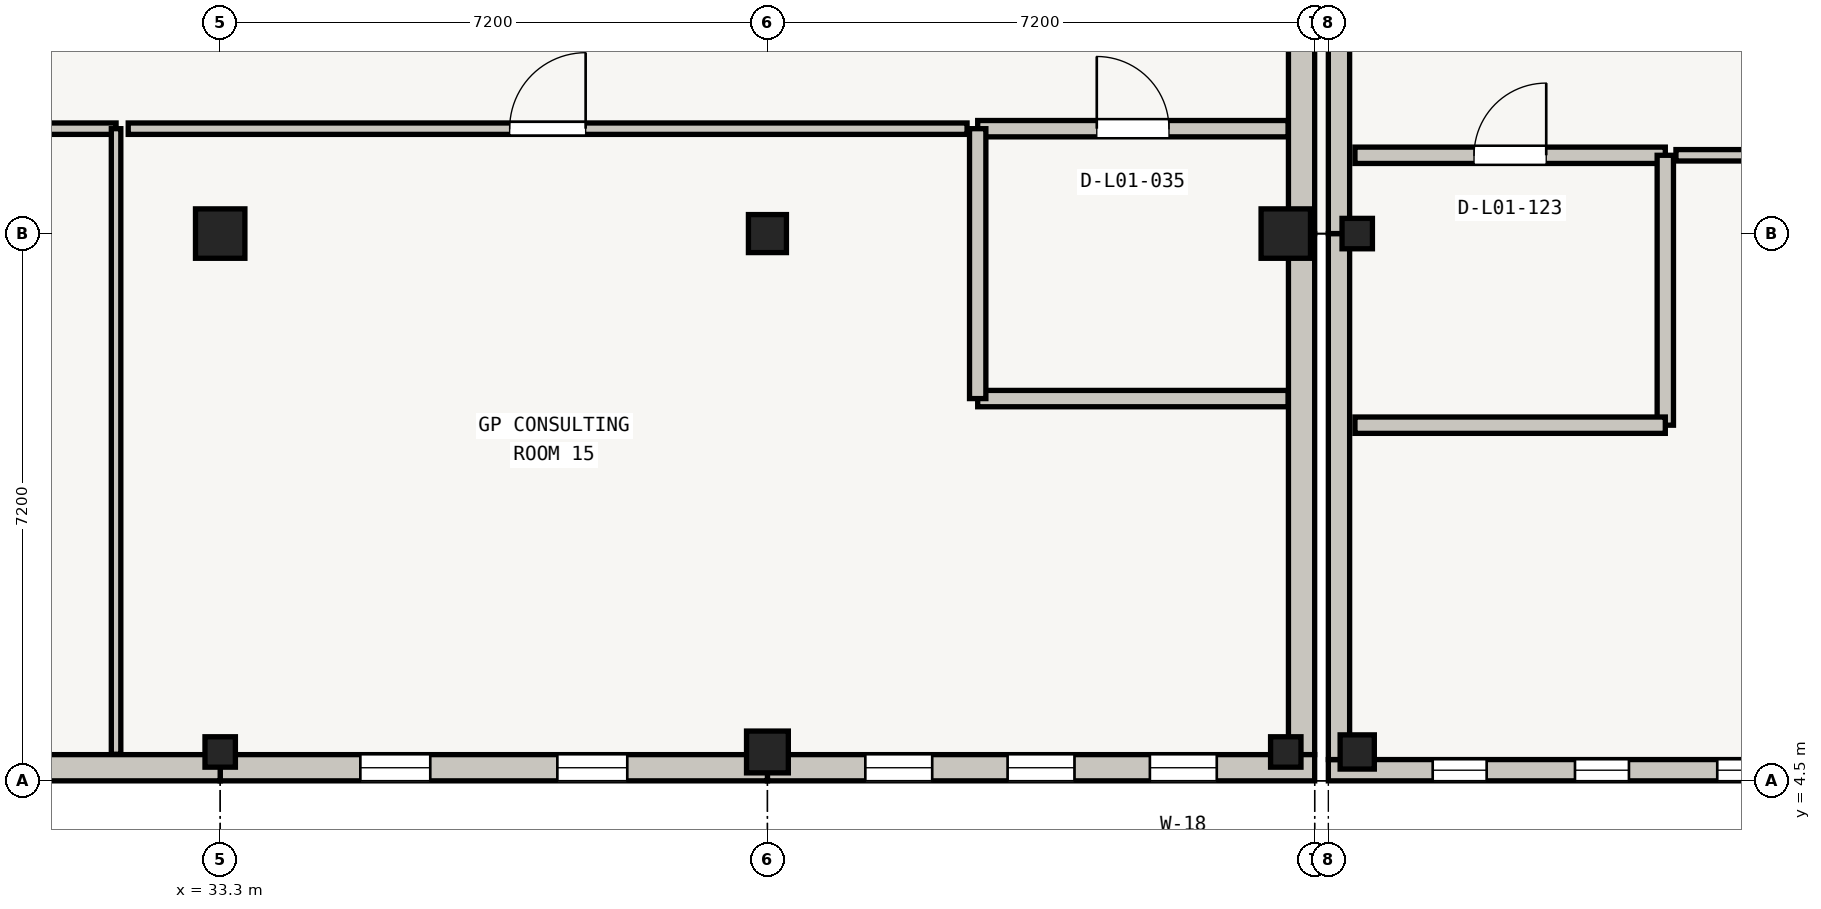
"""IFC4 building model, lengths in metres.
Left out: names, types, materials, properties, quantities, classifications, styles, units other than length and angle.
Written with IfcOpenShell. Run it as: python <this file> out.ifc"""

import sys

from ifc_helpers import new_model, si_unit, direction, frame, frame_2d, origin, origin_2d, place, context, subcontext, project, spatial, rectangle, extrude, element, fill, save


model = new_model("IFC4")
c1 = context("Model", 3, precision=1e-05, world=origin(), true_north=direction((0.0, 1.0)))
c2 = subcontext(c1, "Body", "Model", "MODEL_VIEW")
j1 = project(units=[si_unit("LENGTHUNIT", "METRE"), si_unit("PLANEANGLEUNIT", "RADIAN")], contexts=[c1])
p1 = place(None, origin())
s1 = spatial("IfcSite", under=j1, at=p1, CompositionType="ELEMENT")
p2 = place(p1, origin())
s2 = spatial("IfcBuilding", under=s1, at=p2, CompositionType="ELEMENT")
p3 = place(p2, frame((0.0, 0.0, 4.5)))
s3 = spatial("IfcBuildingStorey", under=s2, at=p3, CompositionType="ELEMENT", Elevation=4.5)
p4 = place(p3, frame((33.3, 4.88, 0.0), z_axis=(0.0, 0.0, 1.0), x_axis=(1.0, 0.0, 0.0)))
e1 = element("IfcColumn", 1, at=p4, inside=s3, PredefinedType="COLUMN", context=c2, shape_type="SweptSolid", body=[
    extrude(rectangle(XDim=0.4, YDim=0.4, at=origin_2d()), origin(), (0.0, 0.0, 1.0), 3.92),
])
p5 = place(p3, frame((33.3, 11.7, 0.0), z_axis=(0.0, 0.0, 1.0), x_axis=(1.0, 0.0, 0.0)))
e2 = element("IfcColumn", 2, at=p5, inside=s3, PredefinedType="COLUMN", context=c2, shape_type="SweptSolid", body=[
    extrude(rectangle(XDim=0.65, YDim=0.65, at=origin_2d()), origin(), (0.0, 0.0, 1.0), 3.92),
])
p6 = place(p3, frame((40.5, 4.88, 0.0), z_axis=(0.0, 0.0, 1.0), x_axis=(1.0, 0.0, 0.0)))
e3 = element("IfcColumn", 3, at=p6, inside=s3, PredefinedType="COLUMN", context=c2, shape_type="SweptSolid", body=[
    extrude(rectangle(XDim=0.55, YDim=0.55, at=origin_2d()), origin(), (0.0, 0.0, 1.0), 3.92),
])
p7 = place(p3, frame((40.5, 11.7, 0.0), z_axis=(0.0, 0.0, 1.0), x_axis=(1.0, 0.0, 0.0)))
e4 = element("IfcColumn", 4, at=p7, inside=s3, PredefinedType="COLUMN", context=c2, shape_type="SweptSolid", body=[
    extrude(rectangle(XDim=0.5, YDim=0.5, at=origin_2d()), origin(), (0.0, 0.0, 1.0), 3.92),
])
p8 = place(p3, frame((47.32, 4.88, 0.0), z_axis=(0.0, 0.0, 1.0), x_axis=(1.0, 0.0, 0.0)))
e5 = element("IfcColumn", 5, at=p8, inside=s3, PredefinedType="COLUMN", context=c2, shape_type="SweptSolid", body=[
    extrude(rectangle(XDim=0.4, YDim=0.4, at=origin_2d()), origin(), (0.0, 0.0, 1.0), 3.92),
])
p9 = place(p3, frame((47.32, 11.7, 0.0), z_axis=(0.0, 0.0, 1.0), x_axis=(1.0, 0.0, 0.0)))
e6 = element("IfcColumn", 6, at=p9, inside=s3, PredefinedType="COLUMN", context=c2, shape_type="SweptSolid", body=[
    extrude(rectangle(XDim=0.65, YDim=0.65, at=origin_2d()), origin(), (0.0, 0.0, 1.0), 3.92),
])
p10 = place(p3, frame((48.26, 4.88, 0.0), z_axis=(0.0, 0.0, 1.0), x_axis=(1.0, 0.0, 0.0)))
e7 = element("IfcColumn", 7, at=p10, inside=s3, PredefinedType="COLUMN", context=c2, shape_type="SweptSolid", body=[
    extrude(rectangle(XDim=0.45, YDim=0.45, at=origin_2d()), origin(), (0.0, 0.0, 1.0), 3.96),
])
p11 = place(p3, frame((48.26, 11.7, 0.0), z_axis=(0.0, 0.0, 1.0), x_axis=(1.0, 0.0, 0.0)))
e8 = element("IfcColumn", 8, at=p11, inside=s3, PredefinedType="COLUMN", context=c2, shape_type="SweptSolid", body=[
    extrude(rectangle(XDim=0.4, YDim=0.4, at=origin_2d()), origin(), (0.0, 0.0, 1.0), 3.96),
])
for number, where, z_axis, x_axis in (
    (9, (47.528, 18.555, 0.0), (0.0, 0.0, 1.0), (0.0, -1.0, 0.0)),
    (10, (47.528, 11.7, 0.0), (0.0, 0.0, 1.0), (0.0, -1.0, 0.0)),
):
    element("IfcWall", number, at=place(p3, frame(where, z_axis=z_axis, x_axis=x_axis)), inside=s3, PredefinedType="SOLIDWALL", context=c2, shape_type="SweptSolid", body=[
        extrude(rectangle(XDim=6.855, YDim=0.345, at=frame_2d((3.427, 0.0))), origin(), (0.0, 0.0, 1.0), 3.325),
    ])
p12 = place(p3, frame((47.7, 4.673, 0.0), z_axis=(0.0, 0.0, 1.0), x_axis=(-1.0, 0.0, 0.0)))
e11 = element("IfcWall", 11, at=p12, inside=s3, PredefinedType="SOLIDWALL", context=c2, shape_type="SweptSolid", body=[
    extrude(rectangle(XDim=7.2, YDim=0.345, at=frame_2d((3.6, 0.0))), origin(), (0.0, 0.0, 1.0), 2.955),
])
p13 = place(p12, frame((1.288, 0.0, 0.55)))
e12 = element("IfcOpeningElement", 12, at=p13, cuts=e11, PredefinedType="OPENING", context=c2, shape_type="SweptSolid", body=[
    extrude(rectangle(XDim=0.88, YDim=2.12, at=frame_2d((0.44, 1.06))), frame((0.0, 0.172, 0.0), z_axis=(0.0, -1.0, 0.0), x_axis=(1.0, 0.0, 0.0)), (0.0, 0.0, 1.0), 0.345),
])
p14 = place(p12, frame((3.16, 0.0, 0.55)))
e13 = element("IfcOpeningElement", 13, at=p14, cuts=e11, PredefinedType="OPENING", context=c2, shape_type="SweptSolid", body=[
    extrude(rectangle(XDim=0.88, YDim=2.12, at=frame_2d((0.44, 1.06))), frame((0.0, 0.172, 0.0), z_axis=(0.0, -1.0, 0.0), x_axis=(1.0, 0.0, 0.0)), (0.0, 0.0, 1.0), 0.345),
])
p15 = place(p12, frame((5.032, 0.0, 0.55)))
e14 = element("IfcOpeningElement", 14, at=p15, cuts=e11, PredefinedType="OPENING", context=c2, shape_type="SweptSolid", body=[
    extrude(rectangle(XDim=0.88, YDim=2.12, at=frame_2d((0.44, 1.06))), frame((0.0, 0.172, 0.0), z_axis=(0.0, -1.0, 0.0), x_axis=(1.0, 0.0, 0.0)), (0.0, 0.0, 1.0), 0.345),
])
p16 = place(p3, frame((40.5, 4.673, 0.0), z_axis=(0.0, 0.0, 1.0), x_axis=(-1.0, 0.0, 0.0)))
e15 = element("IfcWall", 15, at=p16, inside=s3, PredefinedType="SOLIDWALL", context=c2, shape_type="SweptSolid", body=[
    extrude(rectangle(XDim=7.2, YDim=0.345, at=frame_2d((3.6, 0.0))), origin(), (0.0, 0.0, 1.0), 2.955),
])
p17 = place(p16, frame((1.844, 0.0, 0.55)))
e16 = element("IfcOpeningElement", 16, at=p17, cuts=e15, PredefinedType="OPENING", context=c2, shape_type="SweptSolid", body=[
    extrude(rectangle(XDim=0.92, YDim=2.1, at=frame_2d((0.46, 1.05))), frame((0.0, 0.172, 0.0), z_axis=(0.0, -1.0, 0.0), x_axis=(1.0, 0.0, 0.0)), (0.0, 0.0, 1.0), 0.345),
])
p18 = place(p16, frame((4.436, 0.0, 0.55)))
e17 = element("IfcOpeningElement", 17, at=p18, cuts=e15, PredefinedType="OPENING", context=c2, shape_type="SweptSolid", body=[
    extrude(rectangle(XDim=0.92, YDim=2.1, at=frame_2d((0.46, 1.05))), frame((0.0, 0.172, 0.0), z_axis=(0.0, -1.0, 0.0), x_axis=(1.0, 0.0, 0.0)), (0.0, 0.0, 1.0), 0.345),
])
p19 = place(p3, frame((33.3, 4.673, 0.0), z_axis=(0.0, 0.0, 1.0), x_axis=(-1.0, 0.0, 0.0)))
e18 = element("IfcWall", 18, at=p19, inside=s3, PredefinedType="SOLIDWALL", context=c2, shape_type="SweptSolid", body=[
    extrude(rectangle(XDim=7.2, YDim=0.345, at=frame_2d((3.6, 0.0))), origin(), (0.0, 0.0, 1.0), 3.185),
])
p20 = place(p19, frame((2.274, 0.0, 0.55)))
e19 = element("IfcOpeningElement", 19, at=p20, cuts=e18, PredefinedType="OPENING", context=c2, shape_type="SweptSolid", body=[
    extrude(rectangle(XDim=0.96, YDim=2.1, at=frame_2d((0.48, 1.05))), frame((0.0, 0.172, 0.0), z_axis=(0.0, -1.0, 0.0), x_axis=(1.0, 0.0, 0.0)), (0.0, 0.0, 1.0), 0.345),
])
p21 = place(p19, frame((4.416, 0.0, 0.55)))
e20 = element("IfcOpeningElement", 20, at=p21, cuts=e18, PredefinedType="OPENING", context=c2, shape_type="SweptSolid", body=[
    extrude(rectangle(XDim=0.96, YDim=2.1, at=frame_2d((0.48, 1.05))), frame((0.0, 0.172, 0.0), z_axis=(0.0, -1.0, 0.0), x_axis=(1.0, 0.0, 0.0)), (0.0, 0.0, 1.0), 0.345),
])
p22 = place(p3, frame((55.08, 4.64, 0.0), z_axis=(0.0, 0.0, 1.0), x_axis=(-1.0, 0.0, 0.0)))
e21 = element("IfcWall", 21, at=p22, inside=s3, PredefinedType="STANDARD", context=c2, shape_type="SweptSolid", body=[
    extrude(rectangle(XDim=7.2, YDim=0.28, at=frame_2d((3.6, 0.0))), origin(), (0.0, 0.0, 1.0), 3.995),
])
p23 = place(p22, frame((1.373, 0.0, 0.55)))
e22 = element("IfcOpeningElement", 22, at=p23, cuts=e21, PredefinedType="OPENING", context=c2, shape_type="SweptSolid", body=[
    extrude(rectangle(XDim=0.71, YDim=2.14, at=frame_2d((0.355, 1.07))), frame((0.0, 0.14, 0.0), z_axis=(0.0, -1.0, 0.0), x_axis=(1.0, 0.0, 0.0)), (0.0, 0.0, 1.0), 0.28),
])
p24 = place(p22, frame((3.245, 0.0, 0.55)))
e23 = element("IfcOpeningElement", 23, at=p24, cuts=e21, PredefinedType="OPENING", context=c2, shape_type="SweptSolid", body=[
    extrude(rectangle(XDim=0.71, YDim=2.14, at=frame_2d((0.355, 1.07))), frame((0.0, 0.14, 0.0), z_axis=(0.0, -1.0, 0.0), x_axis=(1.0, 0.0, 0.0)), (0.0, 0.0, 1.0), 0.28),
])
p25 = place(p22, frame((5.117, 0.0, 0.55)))
e24 = element("IfcOpeningElement", 24, at=p25, cuts=e21, PredefinedType="OPENING", context=c2, shape_type="SweptSolid", body=[
    extrude(rectangle(XDim=0.71, YDim=2.14, at=frame_2d((0.355, 1.07))), frame((0.0, 0.14, 0.0), z_axis=(0.0, -1.0, 0.0), x_axis=(1.0, 0.0, 0.0)), (0.0, 0.0, 1.0), 0.28),
])
p26 = place(p3, frame((48.02, 4.78, 0.0), z_axis=(0.0, 0.0, 1.0), x_axis=(0.0, 1.0, 0.0)))
e25 = element("IfcWall", 25, at=p26, inside=s3, PredefinedType="STANDARD", context=c2, shape_type="SweptSolid", body=[
    extrude(rectangle(XDim=6.92, YDim=0.28, at=frame_2d((3.46, 0.0))), origin(), (0.0, 0.0, 1.0), 3.995),
])
p27 = place(p3, frame((48.02, 11.7, 0.0), z_axis=(0.0, 0.0, 1.0), x_axis=(0.0, 1.0, 0.0)))
e26 = element("IfcWall", 26, at=p27, inside=s3, PredefinedType="STANDARD", context=c2, shape_type="SweptSolid", body=[
    extrude(rectangle(XDim=6.92, YDim=0.28, at=frame_2d((3.46, 0.0))), origin(), (0.0, 0.0, 1.0), 3.995),
])
p28 = place(p3, frame((43.267, 13.08, 0.0), z_axis=(0.0, 0.0, 1.0), x_axis=(1.0, 0.0, 0.0)))
e27 = element("IfcWall", 27, at=p28, inside=s3, PredefinedType="PLUMBINGWALL", context=c2, shape_type="SweptSolid", body=[
    extrude(rectangle(XDim=4.083, YDim=0.215, at=frame_2d((2.042, 0.0))), origin(), (0.0, 0.0, 1.0), 2.94),
])
p29 = place(p28, frame((1.567, 0.0, 0.0)))
e28 = element("IfcOpeningElement", 28, at=p29, cuts=e27, PredefinedType="OPENING", context=c2, shape_type="SweptSolid", body=[
    extrude(rectangle(XDim=0.95, YDim=2.05, at=frame_2d((0.475, 1.025))), frame((0.0, 0.107, 0.0), z_axis=(0.0, -1.0, 0.0), x_axis=(1.0, 0.0, 0.0)), (0.0, 0.0, 1.0), 0.215),
])
p30 = place(p3, frame((47.35, 9.529, 0.0), z_axis=(0.0, 0.0, 1.0), x_axis=(-1.0, 0.0, 0.0)))
e29 = element("IfcWall", 29, at=p30, inside=s3, PredefinedType="PLUMBINGWALL", context=c2, shape_type="SweptSolid", body=[
    extrude(rectangle(XDim=4.083, YDim=0.215, at=frame_2d((2.042, 0.0))), origin(), (0.0, 0.0, 1.0), 2.94),
])
p31 = place(p3, frame((43.267, 9.529, 0.0), z_axis=(0.0, 0.0, 1.0), x_axis=(0.0, 1.0, 0.0)))
e30 = element("IfcWall", 30, at=p31, inside=s3, PredefinedType="PLUMBINGWALL", context=c2, shape_type="SweptSolid", body=[
    extrude(rectangle(XDim=3.551, YDim=0.215, at=frame_2d((1.775, 0.0))), origin(), (0.0, 0.0, 1.0), 2.94),
])
p32 = place(p3, frame((16.67, 13.08, 0.0), z_axis=(0.0, 0.0, 1.0), x_axis=(1.0, 0.0, 0.0)))
e31 = element("IfcWall", 31, at=p32, inside=s3, PredefinedType="PARTITIONING", context=c2, shape_type="SweptSolid", body=[
    extrude(rectangle(XDim=15.26, YDim=0.15, at=frame_2d((7.63, 0.0))), origin(), (0.0, 0.0, 1.0), 2.94),
])
p33 = place(p32, frame((7.11, 0.0, 0.0)))
e32 = element("IfcOpeningElement", 32, at=p33, cuts=e31, PredefinedType="OPENING", context=c2, shape_type="SweptSolid", body=[
    extrude(rectangle(XDim=1.04, YDim=2.05, at=frame_2d((0.52, 1.025))), frame((0.0, 0.075, 0.0), z_axis=(0.0, -1.0, 0.0), x_axis=(1.0, 0.0, 0.0)), (0.0, 0.0, 1.0), 0.15),
])
p34 = place(p3, frame((31.93, 13.08, 0.0), z_axis=(0.0, 0.0, 1.0), x_axis=(0.0, -1.0, 0.0)))
e33 = element("IfcWall", 33, at=p34, inside=s3, PredefinedType="PARTITIONING", context=c2, shape_type="SweptSolid", body=[
    extrude(rectangle(XDim=8.23, YDim=0.125, at=frame_2d((4.115, 0.0))), origin(), (0.0, 0.0, 1.0), 2.94),
])
p35 = place(p3, frame((32.09, 13.08, 0.0), z_axis=(0.0, 0.0, 1.0), x_axis=(1.0, 0.0, 0.0)))
e34 = element("IfcWall", 34, at=p35, inside=s3, PredefinedType="PARTITIONING", context=c2, shape_type="SweptSolid", body=[
    extrude(rectangle(XDim=11.036, YDim=0.15, at=frame_2d((5.518, 0.0))), origin(), (0.0, 0.0, 1.0), 2.94),
])
p36 = place(p35, frame((5.018, 0.0, 0.0)))
e35 = element("IfcOpeningElement", 35, at=p36, cuts=e34, PredefinedType="OPENING", context=c2, shape_type="SweptSolid", body=[
    extrude(rectangle(XDim=1.0, YDim=2.05, at=frame_2d((0.5, 1.025))), frame((0.0, 0.075, 0.0), z_axis=(0.0, -1.0, 0.0), x_axis=(1.0, 0.0, 0.0)), (0.0, 0.0, 1.0), 0.15),
])
p37 = place(p3, frame((48.23, 12.73, 0.0), z_axis=(0.0, 0.0, 1.0), x_axis=(1.0, 0.0, 0.0)))
e36 = element("IfcWall", 36, at=p37, inside=s3, PredefinedType="PLUMBINGWALL", context=c2, shape_type="SweptSolid", body=[
    extrude(rectangle(XDim=4.083, YDim=0.215, at=frame_2d((2.042, 0.0))), origin(), (0.0, 0.0, 1.0), 2.905),
])
p38 = place(p37, frame((1.567, 0.0, 0.0)))
e37 = element("IfcOpeningElement", 37, at=p38, cuts=e36, PredefinedType="OPENING", context=c2, shape_type="SweptSolid", body=[
    extrude(rectangle(XDim=0.95, YDim=2.05, at=frame_2d((0.475, 1.025))), frame((0.0, 0.107, 0.0), z_axis=(0.0, -1.0, 0.0), x_axis=(1.0, 0.0, 0.0)), (0.0, 0.0, 1.0), 0.215),
])
p39 = place(p3, frame((52.313, 12.73, 0.0), z_axis=(0.0, 0.0, 1.0), x_axis=(0.0, -1.0, 0.0)))
e38 = element("IfcWall", 38, at=p39, inside=s3, PredefinedType="PLUMBINGWALL", context=c2, shape_type="SweptSolid", body=[
    extrude(rectangle(XDim=3.551, YDim=0.215, at=frame_2d((1.775, 0.0))), origin(), (0.0, 0.0, 1.0), 2.905),
])
p40 = place(p3, frame((52.313, 9.179, 0.0), z_axis=(0.0, 0.0, 1.0), x_axis=(-1.0, 0.0, 0.0)))
e39 = element("IfcWall", 39, at=p40, inside=s3, PredefinedType="PLUMBINGWALL", context=c2, shape_type="SweptSolid", body=[
    extrude(rectangle(XDim=4.083, YDim=0.215, at=frame_2d((2.042, 0.0))), origin(), (0.0, 0.0, 1.0), 2.905),
])
p41 = place(p3, frame((52.454, 12.73, 0.0), z_axis=(0.0, 0.0, 1.0), x_axis=(1.0, 0.0, 0.0)))
e40 = element("IfcWall", 40, at=p41, inside=s3, PredefinedType="PARTITIONING", context=c2, shape_type="SweptSolid", body=[
    extrude(rectangle(XDim=7.306, YDim=0.15, at=frame_2d((3.653, 0.0))), origin(), (0.0, 0.0, 1.0), 2.905),
])
p42 = place(p41, frame((4.099, 0.0, 0.0)))
e41 = element("IfcOpeningElement", 41, at=p42, cuts=e40, PredefinedType="OPENING", context=c2, shape_type="SweptSolid", body=[
    extrude(rectangle(XDim=1.0, YDim=2.05, at=frame_2d((0.5, 1.025))), frame((0.0, 0.075, 0.0), z_axis=(0.0, -1.0, 0.0), x_axis=(1.0, 0.0, 0.0)), (0.0, 0.0, 1.0), 0.15),
])
p43 = place(p13, origin())
e42 = element("IfcWindow", 42, at=p43, inside=s3, PartitioningType="SINGLE_PANEL", PredefinedType="WINDOW", context=c2, shape_type="SweptSolid", body=[
    extrude(rectangle(XDim=0.88, YDim=2.12, at=frame_2d((0.44, 1.06))), frame((0.0, 0.03, 0.0), z_axis=(0.0, -1.0, 0.0), x_axis=(1.0, 0.0, 0.0)), (0.0, 0.0, 1.0), 0.06),
])
fill(e12, e42)
p44 = place(p14, origin())
e43 = element("IfcWindow", 43, at=p44, inside=s3, PartitioningType="SINGLE_PANEL", PredefinedType="WINDOW", context=c2, shape_type="SweptSolid", body=[
    extrude(rectangle(XDim=0.88, YDim=2.12, at=frame_2d((0.44, 1.06))), frame((0.0, 0.03, 0.0), z_axis=(0.0, -1.0, 0.0), x_axis=(1.0, 0.0, 0.0)), (0.0, 0.0, 1.0), 0.06),
])
fill(e13, e43)
p45 = place(p15, origin())
e44 = element("IfcWindow", 44, at=p45, inside=s3, PartitioningType="SINGLE_PANEL", PredefinedType="WINDOW", context=c2, shape_type="SweptSolid", body=[
    extrude(rectangle(XDim=0.88, YDim=2.12, at=frame_2d((0.44, 1.06))), frame((0.0, 0.03, 0.0), z_axis=(0.0, -1.0, 0.0), x_axis=(1.0, 0.0, 0.0)), (0.0, 0.0, 1.0), 0.06),
])
fill(e14, e44)
p46 = place(p17, origin())
e45 = element("IfcWindow", 45, at=p46, inside=s3, PartitioningType="DOUBLE_PANEL_VERTICAL", PredefinedType="WINDOW", context=c2, shape_type="SweptSolid", body=[
    extrude(rectangle(XDim=0.92, YDim=2.1, at=frame_2d((0.46, 1.05))), frame((0.0, 0.03, 0.0), z_axis=(0.0, -1.0, 0.0), x_axis=(1.0, 0.0, 0.0)), (0.0, 0.0, 1.0), 0.06),
])
fill(e16, e45)
p47 = place(p18, origin())
e46 = element("IfcWindow", 46, at=p47, inside=s3, PartitioningType="DOUBLE_PANEL_VERTICAL", PredefinedType="WINDOW", context=c2, shape_type="SweptSolid", body=[
    extrude(rectangle(XDim=0.92, YDim=2.1, at=frame_2d((0.46, 1.05))), frame((0.0, 0.03, 0.0), z_axis=(0.0, -1.0, 0.0), x_axis=(1.0, 0.0, 0.0)), (0.0, 0.0, 1.0), 0.06),
])
fill(e17, e46)
p48 = place(p23, origin())
e47 = element("IfcWindow", 47, at=p48, inside=s3, PartitioningType="SINGLE_PANEL", PredefinedType="WINDOW", context=c2, shape_type="SweptSolid", body=[
    extrude(rectangle(XDim=0.71, YDim=2.14, at=frame_2d((0.355, 1.07))), frame((0.0, 0.03, 0.0), z_axis=(0.0, -1.0, 0.0), x_axis=(1.0, 0.0, 0.0)), (0.0, 0.0, 1.0), 0.06),
])
fill(e22, e47)
p49 = place(p24, origin())
e48 = element("IfcWindow", 48, at=p49, inside=s3, PartitioningType="SINGLE_PANEL", PredefinedType="WINDOW", context=c2, shape_type="SweptSolid", body=[
    extrude(rectangle(XDim=0.71, YDim=2.14, at=frame_2d((0.355, 1.07))), frame((0.0, 0.03, 0.0), z_axis=(0.0, -1.0, 0.0), x_axis=(1.0, 0.0, 0.0)), (0.0, 0.0, 1.0), 0.06),
])
fill(e23, e48)
p50 = place(p25, origin())
e49 = element("IfcWindow", 49, at=p50, inside=s3, PartitioningType="SINGLE_PANEL", PredefinedType="WINDOW", context=c2, shape_type="SweptSolid", body=[
    extrude(rectangle(XDim=0.71, YDim=2.14, at=frame_2d((0.355, 1.07))), frame((0.0, 0.03, 0.0), z_axis=(0.0, -1.0, 0.0), x_axis=(1.0, 0.0, 0.0)), (0.0, 0.0, 1.0), 0.06),
])
fill(e24, e49)
p51 = place(p29, origin())
e50 = element("IfcDoor", 50, at=p51, inside=s3, OperationType="SINGLE_SWING_LEFT", PredefinedType="DOOR", context=c2, shape_type="SweptSolid", body=[
    extrude(rectangle(XDim=0.95, YDim=2.05, at=frame_2d((0.475, 1.025))), frame((0.0, 0.025, 0.0), z_axis=(0.0, -1.0, 0.0), x_axis=(1.0, 0.0, 0.0)), (0.0, 0.0, 1.0), 0.05),
])
fill(e28, e50)
p52 = place(p36, origin())
e51 = element("IfcDoor", 51, at=p52, inside=s3, OperationType="SINGLE_SWING_RIGHT", PredefinedType="DOOR", context=c2, shape_type="SweptSolid", body=[
    extrude(rectangle(XDim=1.0, YDim=2.05, at=frame_2d((0.5, 1.025))), frame((0.0, 0.025, 0.0), z_axis=(0.0, -1.0, 0.0), x_axis=(1.0, 0.0, 0.0)), (0.0, 0.0, 1.0), 0.05),
])
fill(e35, e51)
p53 = place(p38, origin())
e52 = element("IfcDoor", 52, at=p53, inside=s3, OperationType="SINGLE_SWING_RIGHT", PredefinedType="DOOR", context=c2, shape_type="SweptSolid", body=[
    extrude(rectangle(XDim=0.95, YDim=2.05, at=frame_2d((0.475, 1.025))), frame((0.0, 0.025, 0.0), z_axis=(0.0, -1.0, 0.0), x_axis=(1.0, 0.0, 0.0)), (0.0, 0.0, 1.0), 0.05),
])
fill(e37, e52)
save(model, sys.argv[1])
